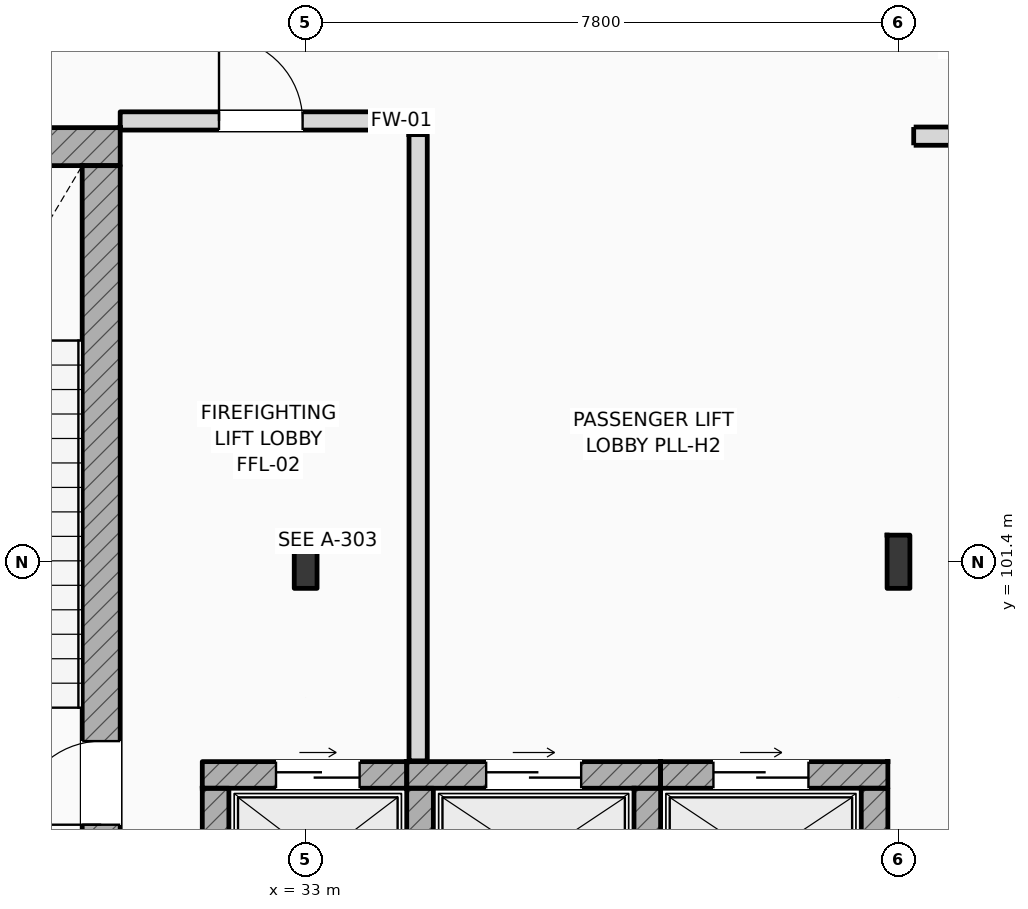
"""IFC4 building model, lengths in metres.
Left out: names, types, materials, properties, quantities, classifications, styles, units other than length and angle.
Written with IfcOpenShell. Run it as: python <this file> out.ifc"""

import sys

from ifc_helpers import new_model, si_unit, direction, frame, frame_2d, origin, origin_2d, place, context, subcontext, project, spatial, rectangle, i_section, extrude, element, fill, save


model = new_model("IFC4")
c1 = context("Model", 3, precision=1e-05, world=origin(), true_north=direction((0.0, 1.0)))
c2 = subcontext(c1, "Body", "Model", "MODEL_VIEW")
j1 = project(units=[si_unit("LENGTHUNIT", "METRE"), si_unit("PLANEANGLEUNIT", "RADIAN")], contexts=[c1])
p1 = place(None, origin())
s1 = spatial("IfcSite", under=j1, at=p1, CompositionType="ELEMENT")
p2 = place(p1, origin())
s2 = spatial("IfcBuilding", under=s1, at=p2, CompositionType="ELEMENT")
p3 = place(p2, frame((0.0, 0.0, 6.0)))
s3 = spatial("IfcBuildingStorey", under=s2, at=p3, CompositionType="ELEMENT", Elevation=6.0)
for number, where, z_axis, x_axis in (
    (1, (33.0, 101.4, 0.0), (0.0, 0.0, 1.0), (1.0, 0.0, 0.0)),
    (2, (40.8, 101.4, 0.0), (0.0, 0.0, 1.0), (1.0, 0.0, 0.0)),
):
    element("IfcColumn", number, at=place(p3, frame(where, z_axis=z_axis, x_axis=x_axis)), inside=s3, PredefinedType="COLUMN", context=c2, shape_type="SweptSolid", body=[
        extrude(i_section(OverallWidth=0.3, OverallDepth=0.7, WebThickness=0.017, FlangeThickness=0.032, FilletRadius=0.027, at=origin_2d()), origin(), (0.0, 0.0, 1.0), 5.4),
    ])
p4 = place(p3, frame((25.4, 106.862, 0.0), z_axis=(0.0, 0.0, 1.0), x_axis=(1.0, 0.0, 0.0)))
e3 = element("IfcWall", 3, at=p4, inside=s3, PredefinedType="SHEAR", context=c2, shape_type="SweptSolid", body=[
    extrude(rectangle(XDim=5.16, YDim=0.5, at=frame_2d((2.58, 0.0))), origin(), (0.0, 0.0, 1.0), 5.4),
])
p5 = place(p3, frame((30.31, 97.5, 0.0), z_axis=(0.0, 0.0, 1.0), x_axis=(0.0, 1.0, 0.0)))
e4 = element("IfcWall", 4, at=p5, inside=s3, PredefinedType="SHEAR", context=c2, shape_type="SweptSolid", body=[
    extrude(rectangle(XDim=9.112, YDim=0.5, at=frame_2d((4.556, 0.0))), origin(), (0.0, 0.0, 1.0), 5.4),
])
p6 = place(p5, frame((0.44, 0.0, 0.0)))
e5 = element("IfcOpeningElement", 5, at=p6, cuts=e4, PredefinedType="OPENING", context=c2, shape_type="SweptSolid", body=[
    extrude(rectangle(XDim=1.1, YDim=2.2, at=frame_2d((0.55, 1.1))), frame((0.0, 0.26, 0.0), z_axis=(0.0, -1.0, 0.0), x_axis=(1.0, 0.0, 0.0)), (0.0, 0.0, 1.0), 0.52),
])
p7 = place(p3, frame((31.64, 98.595, 0.0), z_axis=(0.0, 0.0, 1.0), x_axis=(1.0, 0.0, 0.0)))
e6 = element("IfcWall", 6, at=p7, inside=s3, PredefinedType="SHEAR", context=c2, shape_type="SweptSolid", body=[
    extrude(rectangle(XDim=2.69, YDim=0.35, at=frame_2d((1.345, 0.0))), origin(), (0.0, 0.0, 1.0), 5.05),
])
p8 = place(p7, frame((0.97, 0.0, 0.0)))
e7 = element("IfcOpeningElement", 7, at=p8, cuts=e6, PredefinedType="OPENING", context=c2, shape_type="SweptSolid", body=[
    extrude(rectangle(XDim=1.1, YDim=2.2, at=frame_2d((0.55, 1.1))), frame((0.0, 0.185, 0.0), z_axis=(0.0, -1.0, 0.0), x_axis=(1.0, 0.0, 0.0)), (0.0, 0.0, 1.0), 0.37),
])
p9 = place(p3, frame((31.815, 96.58, 0.0), z_axis=(0.0, 0.0, 1.0), x_axis=(0.0, 1.0, 0.0)))
e8 = element("IfcWall", 8, at=p9, inside=s3, PredefinedType="SHEAR", context=c2, shape_type="SweptSolid", body=[
    extrude(rectangle(XDim=1.84, YDim=0.35, at=frame_2d((0.92, 0.0))), origin(), (0.0, 0.0, 1.0), 5.05),
])
p10 = place(p3, frame((34.33, 98.595, 0.0), z_axis=(0.0, 0.0, 1.0), x_axis=(1.0, 0.0, 0.0)))
e9 = element("IfcWall", 9, at=p10, inside=s3, PredefinedType="SHEAR", context=c2, shape_type="SweptSolid", body=[
    extrude(rectangle(XDim=3.34, YDim=0.35, at=frame_2d((1.67, 0.0))), origin(), (0.0, 0.0, 1.0), 5.05),
])
p11 = place(p10, frame((1.045, 0.0, 0.0)))
e10 = element("IfcOpeningElement", 10, at=p11, cuts=e9, PredefinedType="OPENING", context=c2, shape_type="SweptSolid", body=[
    extrude(rectangle(XDim=1.25, YDim=2.25, at=frame_2d((0.625, 1.125))), frame((0.0, 0.185, 0.0), z_axis=(0.0, -1.0, 0.0), x_axis=(1.0, 0.0, 0.0)), (0.0, 0.0, 1.0), 0.37),
])
for number, where, z_axis, x_axis in (
    (11, (34.505, 96.58, 0.0), (0.0, 0.0, 1.0), (0.0, 1.0, 0.0)),
    (12, (37.495, 96.58, 0.0), (0.0, 0.0, 1.0), (0.0, 1.0, 0.0)),
):
    element("IfcWall", number, at=place(p3, frame(where, z_axis=z_axis, x_axis=x_axis)), inside=s3, PredefinedType="SHEAR", context=c2, shape_type="SweptSolid", body=[
        extrude(rectangle(XDim=1.84, YDim=0.35, at=frame_2d((0.92, 0.0))), origin(), (0.0, 0.0, 1.0), 5.05),
    ])
p12 = place(p3, frame((37.67, 98.595, 0.0), z_axis=(0.0, 0.0, 1.0), x_axis=(1.0, 0.0, 0.0)))
e13 = element("IfcWall", 13, at=p12, inside=s3, PredefinedType="SHEAR", context=c2, shape_type="SweptSolid", body=[
    extrude(rectangle(XDim=2.99, YDim=0.35, at=frame_2d((1.495, 0.0))), origin(), (0.0, 0.0, 1.0), 5.05),
])
p13 = place(p12, frame((0.695, 0.0, 0.0)))
e14 = element("IfcOpeningElement", 14, at=p13, cuts=e13, PredefinedType="OPENING", context=c2, shape_type="SweptSolid", body=[
    extrude(rectangle(XDim=1.25, YDim=2.25, at=frame_2d((0.625, 1.125))), frame((0.0, 0.185, 0.0), z_axis=(0.0, -1.0, 0.0), x_axis=(1.0, 0.0, 0.0)), (0.0, 0.0, 1.0), 0.37),
])
p14 = place(p3, frame((40.485, 96.58, 0.0), z_axis=(0.0, 0.0, 1.0), x_axis=(0.0, 1.0, 0.0)))
e15 = element("IfcWall", 15, at=p14, inside=s3, PredefinedType="SHEAR", context=c2, shape_type="SweptSolid", body=[
    extrude(rectangle(XDim=1.84, YDim=0.35, at=frame_2d((0.92, 0.0))), origin(), (0.0, 0.0, 1.0), 4.59),
])
p15 = place(p3, frame((34.48, 98.78, 0.0), z_axis=(0.0, 0.0, 1.0), x_axis=(0.0, 1.0, 0.0)))
e16 = element("IfcWall", 16, at=p15, inside=s3, PredefinedType="STANDARD", context=c2, shape_type="SweptSolid", body=[
    extrude(rectangle(XDim=8.24, YDim=0.24, at=frame_2d((4.12, 0.0))), origin(), (0.0, 0.0, 1.0), 5.05),
])
p16 = place(p3, frame((30.56, 107.2, 0.0), z_axis=(0.0, 0.0, 1.0), x_axis=(1.0, 0.0, 0.0)))
e17 = element("IfcWall", 17, at=p16, inside=s3, PredefinedType="STANDARD", context=c2, shape_type="SweptSolid", body=[
    extrude(rectangle(XDim=4.1, YDim=0.24, at=frame_2d((2.05, 0.0))), origin(), (0.0, 0.0, 1.0), 5.05),
])
p17 = place(p16, frame((1.3, 0.0, 0.0)))
e18 = element("IfcOpeningElement", 18, at=p17, cuts=e17, PredefinedType="OPENING", context=c2, shape_type="SweptSolid", body=[
    extrude(rectangle(XDim=1.1, YDim=2.2, at=frame_2d((0.55, 1.1))), frame((0.0, 0.13, 0.0), z_axis=(0.0, -1.0, 0.0), x_axis=(1.0, 0.0, 0.0)), (0.0, 0.0, 1.0), 0.26),
])
p18 = place(p3, frame((41.0, 107.0, 0.0), z_axis=(0.0, 0.0, 1.0), x_axis=(1.0, 0.0, 0.0)))
e19 = element("IfcWall", 19, at=p18, inside=s3, PredefinedType="STANDARD", context=c2, shape_type="SweptSolid", body=[
    extrude(rectangle(XDim=22.95, YDim=0.24, at=frame_2d((11.475, 0.0))), origin(), (0.0, 0.0, 1.0), 5.05),
])
p19 = place(p18, frame((10.475, 0.0, 0.0)))
e20 = element("IfcOpeningElement", 20, at=p19, cuts=e19, PredefinedType="OPENING", context=c2, shape_type="SweptSolid", body=[
    extrude(rectangle(XDim=2.0, YDim=2.35, at=frame_2d((1.0, 1.175))), frame((0.0, 0.13, 0.0), z_axis=(0.0, -1.0, 0.0), x_axis=(1.0, 0.0, 0.0)), (0.0, 0.0, 1.0), 0.26),
])
p20 = place(p6, origin())
e21 = element("IfcDoor", 21, at=p20, inside=s3, OperationType="SINGLE_SWING_LEFT", PredefinedType="DOOR", context=c2, shape_type="SweptSolid", body=[
    extrude(rectangle(XDim=1.1, YDim=2.2, at=frame_2d((0.55, 1.1))), frame((0.0, 0.025, 0.0), z_axis=(0.0, -1.0, 0.0), x_axis=(1.0, 0.0, 0.0)), (0.0, 0.0, 1.0), 0.05),
])
fill(e5, e21)
p21 = place(p8, origin())
e22 = element("IfcDoor", 22, at=p21, inside=s3, OperationType="SLIDING_TO_LEFT", PredefinedType="DOOR", context=c2, shape_type="SweptSolid", body=[
    extrude(rectangle(XDim=1.1, YDim=2.2, at=frame_2d((0.55, 1.1))), frame((0.0, 0.025, 0.0), z_axis=(0.0, -1.0, 0.0), x_axis=(1.0, 0.0, 0.0)), (0.0, 0.0, 1.0), 0.05),
])
fill(e7, e22)
p22 = place(p11, origin())
e23 = element("IfcDoor", 23, at=p22, inside=s3, OperationType="SLIDING_TO_LEFT", PredefinedType="DOOR", context=c2, shape_type="SweptSolid", body=[
    extrude(rectangle(XDim=1.25, YDim=2.25, at=frame_2d((0.625, 1.125))), frame((0.0, 0.025, 0.0), z_axis=(0.0, -1.0, 0.0), x_axis=(1.0, 0.0, 0.0)), (0.0, 0.0, 1.0), 0.05),
])
fill(e10, e23)
p23 = place(p13, origin())
e24 = element("IfcDoor", 24, at=p23, inside=s3, OperationType="SLIDING_TO_LEFT", PredefinedType="DOOR", context=c2, shape_type="SweptSolid", body=[
    extrude(rectangle(XDim=1.25, YDim=2.25, at=frame_2d((0.625, 1.125))), frame((0.0, 0.025, 0.0), z_axis=(0.0, -1.0, 0.0), x_axis=(1.0, 0.0, 0.0)), (0.0, 0.0, 1.0), 0.05),
])
fill(e14, e24)
p24 = place(p17, origin())
e25 = element("IfcDoor", 25, at=p24, inside=s3, OperationType="SINGLE_SWING_LEFT", PredefinedType="DOOR", context=c2, shape_type="SweptSolid", body=[
    extrude(rectangle(XDim=1.1, YDim=2.2, at=frame_2d((0.55, 1.1))), frame((0.0, 0.025, 0.0), z_axis=(0.0, -1.0, 0.0), x_axis=(1.0, 0.0, 0.0)), (0.0, 0.0, 1.0), 0.05),
])
fill(e18, e25)
save(model, sys.argv[1])
